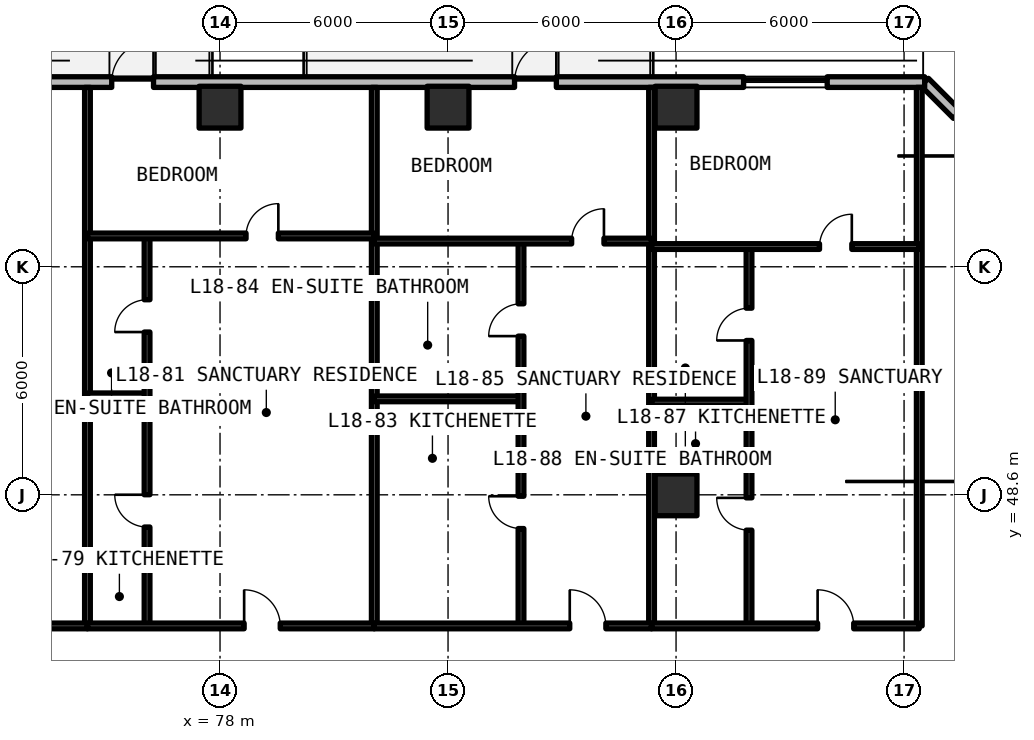
"""IFC4 building model, lengths in metres.
Left out: names, types, materials, properties, quantities, classifications, styles, units other than length and angle.
Written with IfcOpenShell. Run it as: python <this file> out.ifc"""

import sys

from ifc_helpers import new_model, si_unit, direction, frame, frame_2d, origin, origin_2d, place, context, subcontext, project, spatial, rectangle, extrude, element, fill, save


model = new_model("IFC4")
c1 = context("Model", 3, precision=1e-05, world=origin(), true_north=direction((0.0, 1.0)))
c2 = subcontext(c1, "Body", "Model", "MODEL_VIEW")
j1 = project(units=[si_unit("LENGTHUNIT", "METRE"), si_unit("PLANEANGLEUNIT", "RADIAN")], contexts=[c1])
p1 = place(None, origin())
s1 = spatial("IfcSite", under=j1, at=p1, CompositionType="ELEMENT")
p2 = place(p1, origin())
s2 = spatial("IfcBuilding", under=s1, at=p2, CompositionType="ELEMENT")
p3 = place(p2, frame((0.0, 0.0, 66.0)))
s3 = spatial("IfcBuildingStorey", under=s2, at=p3, CompositionType="ELEMENT", Elevation=66.0)
for number, where, z_axis, x_axis in (
    (1, (90.0, 48.6, 0.0), (0.0, 0.0, 1.0), (1.0, 0.0, 0.0)),
    (2, (78.0, 58.8, 0.0), (0.0, 0.0, 1.0), (1.0, 0.0, 0.0)),
    (3, (84.0, 58.8, 0.0), (0.0, 0.0, 1.0), (1.0, 0.0, 0.0)),
    (4, (90.0, 58.8, 0.0), (0.0, 0.0, 1.0), (1.0, 0.0, 0.0)),
):
    element("IfcColumn", number, at=place(p3, frame(where, z_axis=z_axis, x_axis=x_axis)), inside=s3, PredefinedType="COLUMN", context=c2, shape_type="SweptSolid", body=[
        extrude(rectangle(XDim=1.1, YDim=1.1, at=origin_2d()), origin(), (0.0, 0.0, 1.0), 3.63),
    ])
p4 = place(p3, frame((100.66, 55.342, 0.0), z_axis=(0.0, 0.0, 1.0), x_axis=(-0.707106781187, 0.707106781187, 0.0)))
e5 = element("IfcWall", 5, at=p4, inside=s3, PredefinedType="SOLIDWALL", context=c2, shape_type="SweptSolid", body=[
    extrude(rectangle(XDim=5.824, YDim=0.28, at=frame_2d((2.912, 0.0))), origin(), (0.0, 0.0, 1.0), 3.41),
])
p5 = place(p4, frame((1.212, 0.0, 0.78)))
e6 = element("IfcOpeningElement", 6, at=p5, cuts=e5, PredefinedType="OPENING", context=c2, shape_type="SweptSolid", body=[
    extrude(rectangle(XDim=3.4, YDim=1.66, at=frame_2d((1.7, 0.83))), frame((0.0, 0.15, 0.0), z_axis=(0.0, -1.0, 0.0), x_axis=(1.0, 0.0, 0.0)), (0.0, 0.0, 1.0), 0.3),
])
p6 = place(p3, frame((96.542, 59.46, 0.0), z_axis=(0.0, 0.0, 1.0), x_axis=(-1.0, 0.0, 0.0)))
e7 = element("IfcWall", 7, at=p6, inside=s3, PredefinedType="SOLIDWALL", context=c2, shape_type="SweptSolid", body=[
    extrude(rectangle(XDim=44.402, YDim=0.28, at=frame_2d((22.201, 0.0))), origin(), (0.0, 0.0, 1.0), 3.41),
])
p7 = place(p6, frame((33.642, 0.0, 0.0)))
e8 = element("IfcOpeningElement", 8, at=p7, cuts=e7, PredefinedType="OPENING", context=c2, shape_type="SweptSolid", body=[
    extrude(rectangle(XDim=1.1, YDim=2.15, at=frame_2d((0.55, 1.075))), frame((0.0, 0.15, 0.0), z_axis=(0.0, -1.0, 0.0), x_axis=(1.0, 0.0, 0.0)), (0.0, 0.0, 1.0), 0.3),
])
p8 = place(p6, frame((20.292, 0.0, 0.0)))
e9 = element("IfcOpeningElement", 9, at=p8, cuts=e7, PredefinedType="OPENING", context=c2, shape_type="SweptSolid", body=[
    extrude(rectangle(XDim=1.1, YDim=2.15, at=frame_2d((0.55, 1.075))), frame((0.0, 0.15, 0.0), z_axis=(0.0, -1.0, 0.0), x_axis=(1.0, 0.0, 0.0)), (0.0, 0.0, 1.0), 0.3),
])
p9 = place(p6, frame((9.692, 0.0, 0.0)))
e10 = element("IfcOpeningElement", 10, at=p9, cuts=e7, PredefinedType="OPENING", context=c2, shape_type="SweptSolid", body=[
    extrude(rectangle(XDim=1.1, YDim=2.15, at=frame_2d((0.55, 1.075))), frame((0.0, 0.15, 0.0), z_axis=(0.0, -1.0, 0.0), x_axis=(1.0, 0.0, 0.0)), (0.0, 0.0, 1.0), 0.3),
])
p10 = place(p6, frame((39.514, 0.0, 0.78)))
e11 = element("IfcOpeningElement", 11, at=p10, cuts=e7, PredefinedType="OPENING", context=c2, shape_type="SweptSolid", body=[
    extrude(rectangle(XDim=2.2, YDim=1.66, at=frame_2d((1.1, 0.83))), frame((0.0, 0.15, 0.0), z_axis=(0.0, -1.0, 0.0), x_axis=(1.0, 0.0, 0.0)), (0.0, 0.0, 1.0), 0.3),
])
p11 = place(p6, frame((25.379, 0.0, 0.78)))
e12 = element("IfcOpeningElement", 12, at=p11, cuts=e7, PredefinedType="OPENING", context=c2, shape_type="SweptSolid", body=[
    extrude(rectangle(XDim=2.2, YDim=1.66, at=frame_2d((1.1, 0.83))), frame((0.0, 0.15, 0.0), z_axis=(0.0, -1.0, 0.0), x_axis=(1.0, 0.0, 0.0)), (0.0, 0.0, 1.0), 0.3),
])
p12 = place(p6, frame((2.564, 0.0, 0.78)))
e13 = element("IfcOpeningElement", 13, at=p12, cuts=e7, PredefinedType="OPENING", context=c2, shape_type="SweptSolid", body=[
    extrude(rectangle(XDim=2.2, YDim=1.66, at=frame_2d((1.1, 0.83))), frame((0.0, 0.15, 0.0), z_axis=(0.0, -1.0, 0.0), x_axis=(1.0, 0.0, 0.0)), (0.0, 0.0, 1.0), 0.3),
])
for number, where, z_axis, x_axis in (
    (14, (96.4, 45.15, 0.0), (0.0, 0.0, 1.0), (0.0, 1.0, 0.0)),
    (15, (74.511, 45.15, 0.0), (0.0, 0.0, 1.0), (0.0, 1.0, 0.0)),
):
    element("IfcWall", number, at=place(p3, frame(where, z_axis=z_axis, x_axis=x_axis)), inside=s3, PredefinedType="SOLIDWALL", context=c2, shape_type="SweptSolid", body=[
        extrude(rectangle(XDim=14.17, YDim=0.15, at=frame_2d((7.085, 0.0))), origin(), (0.0, 0.0, 1.0), 2.63),
    ])
p13 = place(p3, frame((67.215, 45.15, 0.0), z_axis=(0.0, 0.0, 1.0), x_axis=(1.0, 0.0, 0.0)))
e16 = element("IfcWall", 16, at=p13, inside=s3, PredefinedType="SOLIDWALL", context=c2, shape_type="SweptSolid", body=[
    extrude(rectangle(XDim=7.296, YDim=0.15, at=frame_2d((3.648, 0.0))), origin(), (0.0, 0.0, 1.0), 2.63),
])
p14 = place(p13, frame((3.098, 0.0, 0.0)))
e17 = element("IfcOpeningElement", 17, at=p14, cuts=e16, PredefinedType="OPENING", context=c2, shape_type="SweptSolid", body=[
    extrude(rectangle(XDim=1.1, YDim=2.15, at=frame_2d((0.55, 1.075))), frame((0.0, 0.085, 0.0), z_axis=(0.0, -1.0, 0.0), x_axis=(1.0, 0.0, 0.0)), (0.0, 0.0, 1.0), 0.17),
])
p15 = place(p3, frame((82.059, 45.15, 0.0), z_axis=(0.0, 0.0, 1.0), x_axis=(0.0, 1.0, 0.0)))
e18 = element("IfcWall", 18, at=p15, inside=s3, PredefinedType="SOLIDWALL", context=c2, shape_type="SweptSolid", body=[
    extrude(rectangle(XDim=14.17, YDim=0.15, at=frame_2d((7.085, 0.0))), origin(), (0.0, 0.0, 1.0), 2.63),
])
p16 = place(p3, frame((74.511, 51.204, 0.0), z_axis=(0.0, 0.0, 1.0), x_axis=(1.0, 0.0, 0.0)))
e19 = element("IfcWall", 19, at=p16, inside=s3, PredefinedType="PARTITIONING", context=c2, shape_type="SweptSolid", body=[
    extrude(rectangle(XDim=1.569, YDim=0.15, at=frame_2d((0.784, 0.0))), origin(), (0.0, 0.0, 1.0), 2.63),
])
p17 = place(p3, frame((76.08, 45.15, 0.0), z_axis=(0.0, 0.0, 1.0), x_axis=(0.0, 1.0, 0.0)))
e20 = element("IfcWall", 20, at=p17, inside=s3, PredefinedType="PARTITIONING", context=c2, shape_type="SweptSolid", body=[
    extrude(rectangle(XDim=10.262, YDim=0.15, at=frame_2d((5.131, 0.0))), origin(), (0.0, 0.0, 1.0), 2.63),
])
p18 = place(p17, frame((2.602, 0.0, 0.0)))
e21 = element("IfcOpeningElement", 21, at=p18, cuts=e20, PredefinedType="OPENING", context=c2, shape_type="SweptSolid", body=[
    extrude(rectangle(XDim=0.85, YDim=2.1, at=frame_2d((0.425, 1.05))), frame((0.0, 0.085, 0.0), z_axis=(0.0, -1.0, 0.0), x_axis=(1.0, 0.0, 0.0)), (0.0, 0.0, 1.0), 0.17),
])
p19 = place(p17, frame((7.733, 0.0, 0.0)))
e22 = element("IfcOpeningElement", 22, at=p19, cuts=e20, PredefinedType="OPENING", context=c2, shape_type="SweptSolid", body=[
    extrude(rectangle(XDim=0.85, YDim=2.1, at=frame_2d((0.425, 1.05))), frame((0.0, 0.085, 0.0), z_axis=(0.0, -1.0, 0.0), x_axis=(1.0, 0.0, 0.0)), (0.0, 0.0, 1.0), 0.17),
])
p20 = place(p3, frame((74.511, 55.412, 0.0), z_axis=(0.0, 0.0, 1.0), x_axis=(1.0, 0.0, 0.0)))
e23 = element("IfcWall", 23, at=p20, inside=s3, PredefinedType="PARTITIONING", context=c2, shape_type="SweptSolid", body=[
    extrude(rectangle(XDim=7.548, YDim=0.15, at=frame_2d((3.774, 0.0))), origin(), (0.0, 0.0, 1.0), 2.63),
])
p21 = place(p20, frame((4.173, 0.0, 0.0)))
e24 = element("IfcOpeningElement", 24, at=p21, cuts=e23, PredefinedType="OPENING", context=c2, shape_type="SweptSolid", body=[
    extrude(rectangle(XDim=0.85, YDim=2.1, at=frame_2d((0.425, 1.05))), frame((0.0, 0.085, 0.0), z_axis=(0.0, -1.0, 0.0), x_axis=(1.0, 0.0, 0.0)), (0.0, 0.0, 1.0), 0.17),
])
p22 = place(p3, frame((74.511, 45.15, 0.0), z_axis=(0.0, 0.0, 1.0), x_axis=(1.0, 0.0, 0.0)))
e25 = element("IfcWall", 25, at=p22, inside=s3, PredefinedType="SOLIDWALL", context=c2, shape_type="SweptSolid", body=[
    extrude(rectangle(XDim=7.548, YDim=0.15, at=frame_2d((3.774, 0.0))), origin(), (0.0, 0.0, 1.0), 2.63),
])
p23 = place(p22, frame((4.123, 0.0, 0.0)))
e26 = element("IfcOpeningElement", 26, at=p23, cuts=e25, PredefinedType="OPENING", context=c2, shape_type="SweptSolid", body=[
    extrude(rectangle(XDim=0.95, YDim=2.15, at=frame_2d((0.475, 1.075))), frame((0.0, 0.085, 0.0), z_axis=(0.0, -1.0, 0.0), x_axis=(1.0, 0.0, 0.0)), (0.0, 0.0, 1.0), 0.17),
])
p24 = place(p3, frame((89.355, 45.15, 0.0), z_axis=(0.0, 0.0, 1.0), x_axis=(0.0, 1.0, 0.0)))
e27 = element("IfcWall", 27, at=p24, inside=s3, PredefinedType="SOLIDWALL", context=c2, shape_type="SweptSolid", body=[
    extrude(rectangle(XDim=14.17, YDim=0.15, at=frame_2d((7.085, 0.0))), origin(), (0.0, 0.0, 1.0), 2.63),
])
p25 = place(p3, frame((82.059, 51.125, 0.0), z_axis=(0.0, 0.0, 1.0), x_axis=(1.0, 0.0, 0.0)))
e28 = element("IfcWall", 28, at=p25, inside=s3, PredefinedType="PARTITIONING", context=c2, shape_type="SweptSolid", body=[
    extrude(rectangle(XDim=3.861, YDim=0.15, at=frame_2d((1.93, 0.0))), origin(), (0.0, 0.0, 1.0), 2.63),
])
p26 = place(p3, frame((85.92, 45.15, 0.0), z_axis=(0.0, 0.0, 1.0), x_axis=(0.0, 1.0, 0.0)))
e29 = element("IfcWall", 29, at=p26, inside=s3, PredefinedType="PARTITIONING", context=c2, shape_type="SweptSolid", body=[
    extrude(rectangle(XDim=10.127, YDim=0.15, at=frame_2d((5.063, 0.0))), origin(), (0.0, 0.0, 1.0), 2.63),
])
p27 = place(p26, frame((2.562, 0.0, 0.0)))
e30 = element("IfcOpeningElement", 30, at=p27, cuts=e29, PredefinedType="OPENING", context=c2, shape_type="SweptSolid", body=[
    extrude(rectangle(XDim=0.85, YDim=2.1, at=frame_2d((0.425, 1.05))), frame((0.0, 0.085, 0.0), z_axis=(0.0, -1.0, 0.0), x_axis=(1.0, 0.0, 0.0)), (0.0, 0.0, 1.0), 0.17),
])
p28 = place(p26, frame((7.626, 0.0, 0.0)))
e31 = element("IfcOpeningElement", 31, at=p28, cuts=e29, PredefinedType="OPENING", context=c2, shape_type="SweptSolid", body=[
    extrude(rectangle(XDim=0.85, YDim=2.1, at=frame_2d((0.425, 1.05))), frame((0.0, 0.085, 0.0), z_axis=(0.0, -1.0, 0.0), x_axis=(1.0, 0.0, 0.0)), (0.0, 0.0, 1.0), 0.17),
])
p29 = place(p3, frame((82.059, 55.277, 0.0), z_axis=(0.0, 0.0, 1.0), x_axis=(1.0, 0.0, 0.0)))
e32 = element("IfcWall", 32, at=p29, inside=s3, PredefinedType="PARTITIONING", context=c2, shape_type="SweptSolid", body=[
    extrude(rectangle(XDim=7.296, YDim=0.15, at=frame_2d((3.648, 0.0))), origin(), (0.0, 0.0, 1.0), 2.63),
])
p30 = place(p29, frame((5.194, 0.0, 0.0)))
e33 = element("IfcOpeningElement", 33, at=p30, cuts=e32, PredefinedType="OPENING", context=c2, shape_type="SweptSolid", body=[
    extrude(rectangle(XDim=0.85, YDim=2.1, at=frame_2d((0.425, 1.05))), frame((0.0, 0.085, 0.0), z_axis=(0.0, -1.0, 0.0), x_axis=(1.0, 0.0, 0.0)), (0.0, 0.0, 1.0), 0.17),
])
p31 = place(p3, frame((82.059, 45.15, 0.0), z_axis=(0.0, 0.0, 1.0), x_axis=(1.0, 0.0, 0.0)))
e34 = element("IfcWall", 34, at=p31, inside=s3, PredefinedType="SOLIDWALL", context=c2, shape_type="SweptSolid", body=[
    extrude(rectangle(XDim=7.296, YDim=0.15, at=frame_2d((3.648, 0.0))), origin(), (0.0, 0.0, 1.0), 2.63),
])
p32 = place(p31, frame((5.144, 0.0, 0.0)))
e35 = element("IfcOpeningElement", 35, at=p32, cuts=e34, PredefinedType="OPENING", context=c2, shape_type="SweptSolid", body=[
    extrude(rectangle(XDim=0.95, YDim=2.15, at=frame_2d((0.475, 1.075))), frame((0.0, 0.085, 0.0), z_axis=(0.0, -1.0, 0.0), x_axis=(1.0, 0.0, 0.0)), (0.0, 0.0, 1.0), 0.17),
])
p33 = place(p3, frame((89.355, 51.04, 0.0), z_axis=(0.0, 0.0, 1.0), x_axis=(1.0, 0.0, 0.0)))
e36 = element("IfcWall", 36, at=p33, inside=s3, PredefinedType="PARTITIONING", context=c2, shape_type="SweptSolid", body=[
    extrude(rectangle(XDim=2.565, YDim=0.15, at=frame_2d((1.282, 0.0))), origin(), (0.0, 0.0, 1.0), 2.63),
])
p34 = place(p3, frame((91.92, 45.15, 0.0), z_axis=(0.0, 0.0, 1.0), x_axis=(0.0, 1.0, 0.0)))
e37 = element("IfcWall", 37, at=p34, inside=s3, PredefinedType="PARTITIONING", context=c2, shape_type="SweptSolid", body=[
    extrude(rectangle(XDim=9.983, YDim=0.15, at=frame_2d((4.991, 0.0))), origin(), (0.0, 0.0, 1.0), 2.63),
])
p35 = place(p34, frame((2.52, 0.0, 0.0)))
e38 = element("IfcOpeningElement", 38, at=p35, cuts=e37, PredefinedType="OPENING", context=c2, shape_type="SweptSolid", body=[
    extrude(rectangle(XDim=0.85, YDim=2.1, at=frame_2d((0.425, 1.05))), frame((0.0, 0.085, 0.0), z_axis=(0.0, -1.0, 0.0), x_axis=(1.0, 0.0, 0.0)), (0.0, 0.0, 1.0), 0.17),
])
p36 = place(p34, frame((7.511, 0.0, 0.0)))
e39 = element("IfcOpeningElement", 39, at=p36, cuts=e37, PredefinedType="OPENING", context=c2, shape_type="SweptSolid", body=[
    extrude(rectangle(XDim=0.85, YDim=2.1, at=frame_2d((0.425, 1.05))), frame((0.0, 0.085, 0.0), z_axis=(0.0, -1.0, 0.0), x_axis=(1.0, 0.0, 0.0)), (0.0, 0.0, 1.0), 0.17),
])
p37 = place(p3, frame((89.355, 55.133, 0.0), z_axis=(0.0, 0.0, 1.0), x_axis=(1.0, 0.0, 0.0)))
e40 = element("IfcWall", 40, at=p37, inside=s3, PredefinedType="PARTITIONING", context=c2, shape_type="SweptSolid", body=[
    extrude(rectangle(XDim=7.045, YDim=0.15, at=frame_2d((3.522, 0.0))), origin(), (0.0, 0.0, 1.0), 2.63),
])
p38 = place(p37, frame((4.42, 0.0, 0.0)))
e41 = element("IfcOpeningElement", 41, at=p38, cuts=e40, PredefinedType="OPENING", context=c2, shape_type="SweptSolid", body=[
    extrude(rectangle(XDim=0.85, YDim=2.1, at=frame_2d((0.425, 1.05))), frame((0.0, 0.085, 0.0), z_axis=(0.0, -1.0, 0.0), x_axis=(1.0, 0.0, 0.0)), (0.0, 0.0, 1.0), 0.17),
])
p39 = place(p3, frame((89.355, 45.15, 0.0), z_axis=(0.0, 0.0, 1.0), x_axis=(1.0, 0.0, 0.0)))
e42 = element("IfcWall", 42, at=p39, inside=s3, PredefinedType="SOLIDWALL", context=c2, shape_type="SweptSolid", body=[
    extrude(rectangle(XDim=7.045, YDim=0.15, at=frame_2d((3.522, 0.0))), origin(), (0.0, 0.0, 1.0), 2.63),
])
p40 = place(p39, frame((4.37, 0.0, 0.0)))
e43 = element("IfcOpeningElement", 43, at=p40, cuts=e42, PredefinedType="OPENING", context=c2, shape_type="SweptSolid", body=[
    extrude(rectangle(XDim=0.95, YDim=2.15, at=frame_2d((0.475, 1.075))), frame((0.0, 0.085, 0.0), z_axis=(0.0, -1.0, 0.0), x_axis=(1.0, 0.0, 0.0)), (0.0, 0.0, 1.0), 0.17),
])
p41 = place(p8, frame((1.1, 0.0, 0.0), z_axis=(0.0, 0.0, 1.0), x_axis=(-1.0, 0.0, 0.0)))
e44 = element("IfcDoor", 44, at=p41, inside=s3, OperationType="SINGLE_SWING_RIGHT", PredefinedType="DOOR", context=c2, shape_type="SweptSolid", body=[
    extrude(rectangle(XDim=1.1, YDim=2.15, at=frame_2d((0.55, 1.075))), frame((0.0, 0.025, 0.0), z_axis=(0.0, -1.0, 0.0), x_axis=(1.0, 0.0, 0.0)), (0.0, 0.0, 1.0), 0.05),
])
fill(e9, e44)
p42 = place(p9, frame((1.1, 0.0, 0.0), z_axis=(0.0, 0.0, 1.0), x_axis=(-1.0, 0.0, 0.0)))
e45 = element("IfcDoor", 45, at=p42, inside=s3, OperationType="SINGLE_SWING_LEFT", PredefinedType="DOOR", context=c2, shape_type="SweptSolid", body=[
    extrude(rectangle(XDim=1.1, YDim=2.15, at=frame_2d((0.55, 1.075))), frame((0.0, 0.025, 0.0), z_axis=(0.0, -1.0, 0.0), x_axis=(1.0, 0.0, 0.0)), (0.0, 0.0, 1.0), 0.05),
])
fill(e10, e45)
p43 = place(p12, origin())
e46 = element("IfcWindow", 46, at=p43, inside=s3, PartitioningType="SINGLE_PANEL", PredefinedType="WINDOW", context=c2, shape_type="SweptSolid", body=[
    extrude(rectangle(XDim=2.2, YDim=1.66, at=frame_2d((1.1, 0.83))), frame((0.0, 0.03, 0.0), z_axis=(0.0, -1.0, 0.0), x_axis=(1.0, 0.0, 0.0)), (0.0, 0.0, 1.0), 0.06),
])
fill(e13, e46)
p44 = place(p18, origin())
e47 = element("IfcDoor", 47, at=p44, inside=s3, OperationType="SINGLE_SWING_RIGHT", PredefinedType="DOOR", context=c2, shape_type="SweptSolid", body=[
    extrude(rectangle(XDim=0.85, YDim=2.1, at=frame_2d((0.425, 1.05))), frame((0.0, 0.025, 0.0), z_axis=(0.0, -1.0, 0.0), x_axis=(1.0, 0.0, 0.0)), (0.0, 0.0, 1.0), 0.05),
])
fill(e21, e47)
p45 = place(p19, origin())
e48 = element("IfcDoor", 48, at=p45, inside=s3, OperationType="SINGLE_SWING_LEFT", PredefinedType="DOOR", context=c2, shape_type="SweptSolid", body=[
    extrude(rectangle(XDim=0.85, YDim=2.1, at=frame_2d((0.425, 1.05))), frame((0.0, 0.025, 0.0), z_axis=(0.0, -1.0, 0.0), x_axis=(1.0, 0.0, 0.0)), (0.0, 0.0, 1.0), 0.05),
])
fill(e22, e48)
p46 = place(p21, origin())
e49 = element("IfcDoor", 49, at=p46, inside=s3, OperationType="SINGLE_SWING_RIGHT", PredefinedType="DOOR", context=c2, shape_type="SweptSolid", body=[
    extrude(rectangle(XDim=0.85, YDim=2.1, at=frame_2d((0.425, 1.05))), frame((0.0, 0.025, 0.0), z_axis=(0.0, -1.0, 0.0), x_axis=(1.0, 0.0, 0.0)), (0.0, 0.0, 1.0), 0.05),
])
fill(e24, e49)
p47 = place(p23, origin())
e50 = element("IfcDoor", 50, at=p47, inside=s3, OperationType="SINGLE_SWING_LEFT", PredefinedType="DOOR", context=c2, shape_type="SweptSolid", body=[
    extrude(rectangle(XDim=0.95, YDim=2.15, at=frame_2d((0.475, 1.075))), frame((0.0, 0.025, 0.0), z_axis=(0.0, -1.0, 0.0), x_axis=(1.0, 0.0, 0.0)), (0.0, 0.0, 1.0), 0.05),
])
fill(e26, e50)
p48 = place(p27, origin())
e51 = element("IfcDoor", 51, at=p48, inside=s3, OperationType="SINGLE_SWING_RIGHT", PredefinedType="DOOR", context=c2, shape_type="SweptSolid", body=[
    extrude(rectangle(XDim=0.85, YDim=2.1, at=frame_2d((0.425, 1.05))), frame((0.0, 0.025, 0.0), z_axis=(0.0, -1.0, 0.0), x_axis=(1.0, 0.0, 0.0)), (0.0, 0.0, 1.0), 0.05),
])
fill(e30, e51)
p49 = place(p28, origin())
e52 = element("IfcDoor", 52, at=p49, inside=s3, OperationType="SINGLE_SWING_LEFT", PredefinedType="DOOR", context=c2, shape_type="SweptSolid", body=[
    extrude(rectangle(XDim=0.85, YDim=2.1, at=frame_2d((0.425, 1.05))), frame((0.0, 0.025, 0.0), z_axis=(0.0, -1.0, 0.0), x_axis=(1.0, 0.0, 0.0)), (0.0, 0.0, 1.0), 0.05),
])
fill(e31, e52)
p50 = place(p30, origin())
e53 = element("IfcDoor", 53, at=p50, inside=s3, OperationType="SINGLE_SWING_RIGHT", PredefinedType="DOOR", context=c2, shape_type="SweptSolid", body=[
    extrude(rectangle(XDim=0.85, YDim=2.1, at=frame_2d((0.425, 1.05))), frame((0.0, 0.025, 0.0), z_axis=(0.0, -1.0, 0.0), x_axis=(1.0, 0.0, 0.0)), (0.0, 0.0, 1.0), 0.05),
])
fill(e33, e53)
p51 = place(p32, origin())
e54 = element("IfcDoor", 54, at=p51, inside=s3, OperationType="SINGLE_SWING_LEFT", PredefinedType="DOOR", context=c2, shape_type="SweptSolid", body=[
    extrude(rectangle(XDim=0.95, YDim=2.15, at=frame_2d((0.475, 1.075))), frame((0.0, 0.025, 0.0), z_axis=(0.0, -1.0, 0.0), x_axis=(1.0, 0.0, 0.0)), (0.0, 0.0, 1.0), 0.05),
])
fill(e35, e54)
p52 = place(p35, origin())
e55 = element("IfcDoor", 55, at=p52, inside=s3, OperationType="SINGLE_SWING_RIGHT", PredefinedType="DOOR", context=c2, shape_type="SweptSolid", body=[
    extrude(rectangle(XDim=0.85, YDim=2.1, at=frame_2d((0.425, 1.05))), frame((0.0, 0.025, 0.0), z_axis=(0.0, -1.0, 0.0), x_axis=(1.0, 0.0, 0.0)), (0.0, 0.0, 1.0), 0.05),
])
fill(e38, e55)
p53 = place(p36, origin())
e56 = element("IfcDoor", 56, at=p53, inside=s3, OperationType="SINGLE_SWING_LEFT", PredefinedType="DOOR", context=c2, shape_type="SweptSolid", body=[
    extrude(rectangle(XDim=0.85, YDim=2.1, at=frame_2d((0.425, 1.05))), frame((0.0, 0.025, 0.0), z_axis=(0.0, -1.0, 0.0), x_axis=(1.0, 0.0, 0.0)), (0.0, 0.0, 1.0), 0.05),
])
fill(e39, e56)
p54 = place(p38, origin())
e57 = element("IfcDoor", 57, at=p54, inside=s3, OperationType="SINGLE_SWING_RIGHT", PredefinedType="DOOR", context=c2, shape_type="SweptSolid", body=[
    extrude(rectangle(XDim=0.85, YDim=2.1, at=frame_2d((0.425, 1.05))), frame((0.0, 0.025, 0.0), z_axis=(0.0, -1.0, 0.0), x_axis=(1.0, 0.0, 0.0)), (0.0, 0.0, 1.0), 0.05),
])
fill(e41, e57)
p55 = place(p40, origin())
e58 = element("IfcDoor", 58, at=p55, inside=s3, OperationType="SINGLE_SWING_LEFT", PredefinedType="DOOR", context=c2, shape_type="SweptSolid", body=[
    extrude(rectangle(XDim=0.95, YDim=2.15, at=frame_2d((0.475, 1.075))), frame((0.0, 0.025, 0.0), z_axis=(0.0, -1.0, 0.0), x_axis=(1.0, 0.0, 0.0)), (0.0, 0.0, 1.0), 0.05),
])
fill(e43, e58)
save(model, sys.argv[1])
